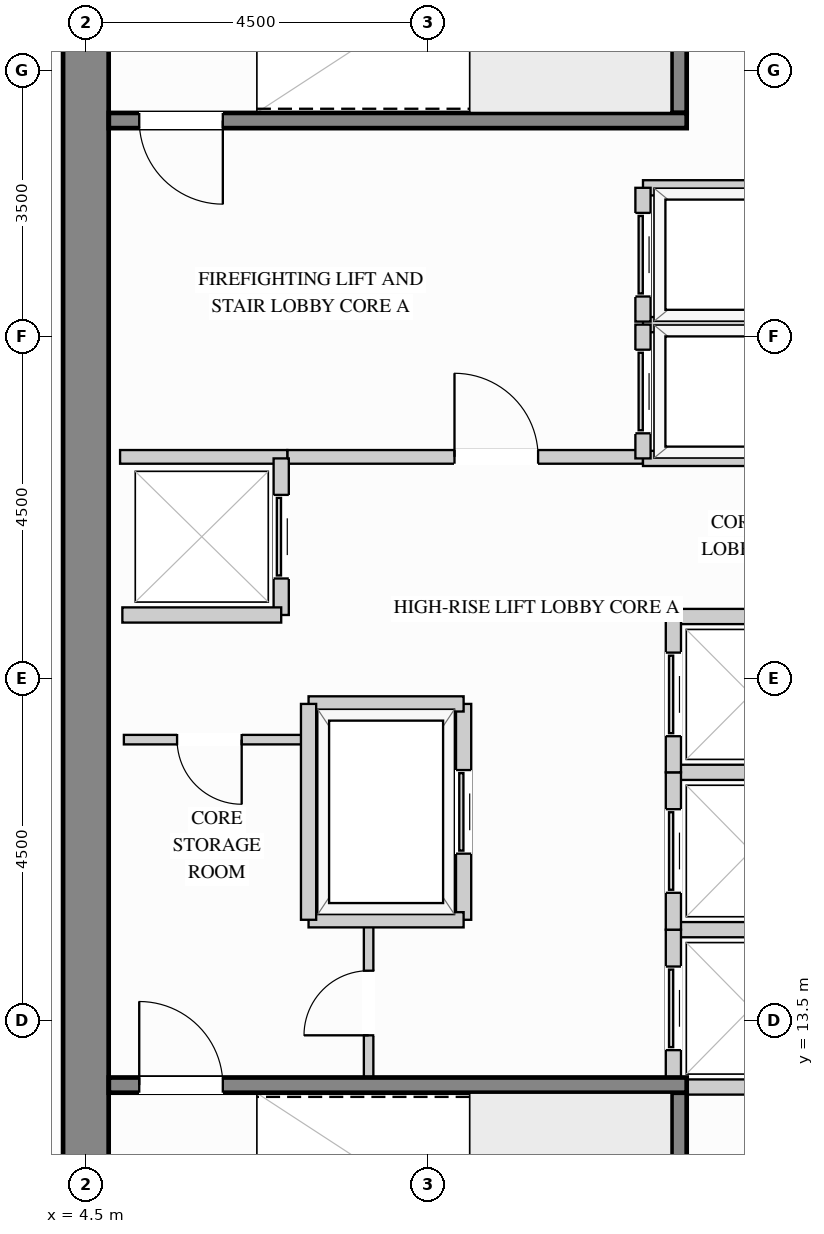
"""IFC4 building model, lengths in metres.
Left out: names, types, materials, properties, quantities, classifications, styles, units other than length and angle.
Written with IfcOpenShell. Run it as: python <this file> out.ifc"""

import sys

from ifc_helpers import new_model, si_unit, direction, frame, frame_2d, origin, place, context, subcontext, project, spatial, rectangle, extrude, source, transform, mapped, element, fill, save


model = new_model("IFC4")
c1 = context("Model", 3, precision=1e-05, world=origin(), true_north=direction((0.0, 1.0)))
c2 = subcontext(c1, "Body", "Model", "MODEL_VIEW")
j1 = project(units=[si_unit("LENGTHUNIT", "METRE"), si_unit("PLANEANGLEUNIT", "RADIAN")], contexts=[c1])
p1 = place(None, origin())
s1 = spatial("IfcSite", under=j1, at=p1, CompositionType="ELEMENT")
p2 = place(p1, origin())
s2 = spatial("IfcBuilding", under=s1, at=p2, CompositionType="ELEMENT")
p3 = place(p2, frame((0.0, 0.0, 171.9)))
s3 = spatial("IfcBuildingStorey", under=s2, at=p3, CompositionType="ELEMENT", Elevation=171.9)
m1 = source(origin(), c2, "Body", "SweptSolid", [
    extrude(rectangle(XDim=20.4, YDim=0.6, at=frame_2d((10.2, 0.0))), origin(), (0.0, 0.0, 1.0), 3.4),
])
p4 = place(p3, frame((4.5, 8.8, 0.0), z_axis=(0.0, 0.0, 1.0), x_axis=(0.0, 1.0, 0.0)))
e1 = element("IfcWall", 1, at=p4, inside=s3, PredefinedType="SHEAR", context=c2, shape_type="MappedRepresentation", body=[
    mapped(m1, transform((0.0, 0.0, 0.0), x_axis=(1.0, 0.0, 0.0), y_axis=(0.0, 1.0, 0.0), z_axis=(0.0, 0.0, 1.0))),
])
p5 = place(p3, frame((7.15, 20.92, 0.0), z_axis=(0.0, 0.0, 1.0), x_axis=(1.0, 0.0, 0.0)))
e2 = element("IfcWall", 2, at=p5, inside=s3, PredefinedType="PARTITIONING", context=c2, shape_type="SweptSolid", body=[
    extrude(rectangle(XDim=4.68, YDim=0.18, at=frame_2d((2.34, 0.0))), origin(), (0.0, 0.0, 1.0), 3.385),
])
p6 = place(p5, frame((2.2, 0.0, 0.0)))
e3 = element("IfcOpeningElement", 3, at=p6, cuts=e2, PredefinedType="OPENING", context=c2, shape_type="SweptSolid", body=[
    extrude(rectangle(XDim=1.1, YDim=2.15, at=frame_2d((0.55, 1.075))), frame((0.0, 0.1, 0.0), z_axis=(0.0, -1.0, 0.0), x_axis=(1.0, 0.0, 0.0)), (0.0, 0.0, 1.0), 0.2),
])
m2 = source(origin(), c2, "Body", "SweptSolid", [
    extrude(rectangle(XDim=2.2, YDim=0.18, at=frame_2d((1.1, 0.0))), origin(), (0.0, 0.0, 1.0), 3.385),
])
p7 = place(p3, frame((4.95, 20.92, 0.0), z_axis=(0.0, 0.0, 1.0), x_axis=(1.0, 0.0, 0.0)))
e4 = element("IfcWall", 4, at=p7, inside=s3, PredefinedType="PARTITIONING", context=c2, shape_type="MappedRepresentation", body=[
    mapped(m2, transform((0.0, 0.0, 0.0), x_axis=(1.0, 0.0, 0.0), y_axis=(0.0, 1.0, 0.0), z_axis=(0.0, 0.0, 1.0))),
])
p8 = place(p3, frame((8.22, 12.75, 0.0), z_axis=(0.0, 0.0, 1.0), x_axis=(0.0, 1.0, 0.0)))
e5 = element("IfcWall", 5, at=p8, inside=s3, PredefinedType="PARTITIONING", context=c2, shape_type="SweptSolid", body=[
    extrude(rectangle(XDim=2.07, YDim=0.125, at=frame_2d((1.035, 0.0))), origin(), (0.0, 0.0, 1.0), 3.385),
])
p9 = place(p8, frame((0.56, 0.0, 0.0)))
e6 = element("IfcOpeningElement", 6, at=p9, cuts=e5, PredefinedType="OPENING", context=c2, shape_type="SweptSolid", body=[
    extrude(rectangle(XDim=0.85, YDim=2.1, at=frame_2d((0.425, 1.05))), frame((0.0, 0.073, 0.0), z_axis=(0.0, -1.0, 0.0), x_axis=(1.0, 0.0, 0.0)), (0.0, 0.0, 1.0), 0.145),
])
p10 = place(p3, frame((5.0, 17.2, 0.0), z_axis=(0.0, 0.0, 1.0), x_axis=(1.0, 0.0, 0.0)))
e7 = element("IfcWall", 7, at=p10, inside=s3, PredefinedType="PARTITIONING", context=c2, shape_type="SweptSolid", body=[
    extrude(rectangle(XDim=2.4, YDim=0.125, at=frame_2d((1.2, 0.0))), origin(), (0.0, 0.0, 1.0), 3.385),
])
p11 = place(p10, frame((0.7, 0.0, 0.0)))
e8 = element("IfcOpeningElement", 8, at=p11, cuts=e7, PredefinedType="OPENING", context=c2, shape_type="SweptSolid", body=[
    extrude(rectangle(XDim=0.85, YDim=2.1, at=frame_2d((0.425, 1.05))), frame((0.0, 0.073, 0.0), z_axis=(0.0, -1.0, 0.0), x_axis=(1.0, 0.0, 0.0)), (0.0, 0.0, 1.0), 0.145),
])
m3 = source(origin(), c2, "Body", "SweptSolid", [
    extrude(rectangle(XDim=2.34, YDim=0.2, at=frame_2d((1.17, 0.0))), origin(), (0.0, 0.0, 1.0), 3.385),
])
for number, where, z_axis, x_axis in (
    (9, (11.83, 22.66, 0.0), (0.0, 0.0, 1.0), (1.0, 0.0, 0.0)),
    (10, (11.83, 20.9, 0.0), (0.0, 0.0, 1.0), (1.0, 0.0, 0.0)),
):
    element("IfcWall", number, at=place(p3, frame(where, z_axis=z_axis, x_axis=x_axis)), inside=s3, PredefinedType="PARTITIONING", context=c2, shape_type="MappedRepresentation", body=[
        mapped(m3, transform((0.0, 0.0, 0.0), x_axis=(1.0, 0.0, 0.0), y_axis=(0.0, 1.0, 0.0), z_axis=(0.0, 0.0, 1.0))),
    ])
p12 = place(p3, frame((11.83, 20.9, 0.0), z_axis=(0.0, 0.0, 1.0), x_axis=(0.0, 1.0, 0.0)))
e11 = element("IfcWall", 11, at=p12, inside=s3, PredefinedType="PARTITIONING", context=c2, shape_type="SweptSolid", body=[
    extrude(rectangle(XDim=1.76, YDim=0.2, at=frame_2d((0.88, 0.0))), origin(), (0.0, 0.0, 1.0), 3.385),
])
p13 = place(p12, frame((0.33, 0.0, 0.0)))
e12 = element("IfcOpeningElement", 12, at=p13, cuts=e11, PredefinedType="OPENING", context=c2, shape_type="SweptSolid", body=[
    extrude(rectangle(XDim=1.1, YDim=2.2, at=frame_2d((0.55, 1.1))), frame((0.0, 0.11, 0.0), z_axis=(0.0, -1.0, 0.0), x_axis=(1.0, 0.0, 0.0)), (0.0, 0.0, 1.0), 0.22),
])
p14 = place(p3, frame((11.83, 24.46, 0.0), z_axis=(0.0, 0.0, 1.0), x_axis=(1.0, 0.0, 0.0)))
e13 = element("IfcWall", 13, at=p14, inside=s3, PredefinedType="PARTITIONING", context=c2, shape_type="MappedRepresentation", body=[
    mapped(m3, transform((0.0, 0.0, 0.0), x_axis=(1.0, 0.0, 0.0), y_axis=(0.0, 1.0, 0.0), z_axis=(0.0, 0.0, 1.0))),
])
p15 = place(p3, frame((11.83, 22.7, 0.0), z_axis=(0.0, 0.0, 1.0), x_axis=(0.0, 1.0, 0.0)))
e14 = element("IfcWall", 14, at=p15, inside=s3, PredefinedType="PARTITIONING", context=c2, shape_type="SweptSolid", body=[
    extrude(rectangle(XDim=1.76, YDim=0.2, at=frame_2d((0.88, 0.0))), origin(), (0.0, 0.0, 1.0), 3.385),
])
p16 = place(p15, frame((0.33, 0.0, 0.0)))
e15 = element("IfcOpeningElement", 15, at=p16, cuts=e14, PredefinedType="OPENING", context=c2, shape_type="SweptSolid", body=[
    extrude(rectangle(XDim=1.1, YDim=2.2, at=frame_2d((0.55, 1.1))), frame((0.0, 0.11, 0.0), z_axis=(0.0, -1.0, 0.0), x_axis=(1.0, 0.0, 0.0)), (0.0, 0.0, 1.0), 0.22),
])
m4 = source(origin(), c2, "Body", "SweptSolid", [
    extrude(rectangle(XDim=1.94, YDim=0.2, at=frame_2d((0.97, 0.0))), origin(), (0.0, 0.0, 1.0), 3.385),
])
for number, where, z_axis, x_axis in (
    (16, (12.23, 14.7, 0.0), (0.0, 0.0, 1.0), (1.0, 0.0, 0.0)),
    (17, (12.23, 12.63, 0.0), (0.0, 0.0, 1.0), (1.0, 0.0, 0.0)),
):
    element("IfcWall", number, at=place(p3, frame(where, z_axis=z_axis, x_axis=x_axis)), inside=s3, PredefinedType="PARTITIONING", context=c2, shape_type="MappedRepresentation", body=[
        mapped(m4, transform((0.0, 0.0, 0.0), x_axis=(1.0, 0.0, 0.0), y_axis=(0.0, 1.0, 0.0), z_axis=(0.0, 0.0, 1.0))),
    ])
p17 = place(p3, frame((12.23, 12.63, 0.0), z_axis=(0.0, 0.0, 1.0), x_axis=(0.0, 1.0, 0.0)))
e18 = element("IfcWall", 18, at=p17, inside=s3, PredefinedType="PARTITIONING", context=c2, shape_type="SweptSolid", body=[
    extrude(rectangle(XDim=2.07, YDim=0.2, at=frame_2d((1.035, 0.0))), origin(), (0.0, 0.0, 1.0), 3.385),
])
p18 = place(p17, frame((0.485, 0.0, 0.0)))
e19 = element("IfcOpeningElement", 19, at=p18, cuts=e18, PredefinedType="OPENING", context=c2, shape_type="SweptSolid", body=[
    extrude(rectangle(XDim=1.1, YDim=2.2, at=frame_2d((0.55, 1.1))), frame((0.0, 0.11, 0.0), z_axis=(0.0, -1.0, 0.0), x_axis=(1.0, 0.0, 0.0)), (0.0, 0.0, 1.0), 0.22),
])
p19 = place(p3, frame((12.23, 16.77, 0.0), z_axis=(0.0, 0.0, 1.0), x_axis=(1.0, 0.0, 0.0)))
e20 = element("IfcWall", 20, at=p19, inside=s3, PredefinedType="PARTITIONING", context=c2, shape_type="MappedRepresentation", body=[
    mapped(m4, transform((0.0, 0.0, 0.0), x_axis=(1.0, 0.0, 0.0), y_axis=(0.0, 1.0, 0.0), z_axis=(0.0, 0.0, 1.0))),
])
p20 = place(p3, frame((12.23, 14.7, 0.0), z_axis=(0.0, 0.0, 1.0), x_axis=(0.0, 1.0, 0.0)))
e21 = element("IfcWall", 21, at=p20, inside=s3, PredefinedType="PARTITIONING", context=c2, shape_type="SweptSolid", body=[
    extrude(rectangle(XDim=2.07, YDim=0.2, at=frame_2d((1.035, 0.0))), origin(), (0.0, 0.0, 1.0), 3.385),
])
p21 = place(p20, frame((0.485, 0.0, 0.0)))
e22 = element("IfcOpeningElement", 22, at=p21, cuts=e21, PredefinedType="OPENING", context=c2, shape_type="SweptSolid", body=[
    extrude(rectangle(XDim=1.1, YDim=2.2, at=frame_2d((0.55, 1.1))), frame((0.0, 0.11, 0.0), z_axis=(0.0, -1.0, 0.0), x_axis=(1.0, 0.0, 0.0)), (0.0, 0.0, 1.0), 0.22),
])
p22 = place(p3, frame((12.23, 18.82, 0.0), z_axis=(0.0, 0.0, 1.0), x_axis=(1.0, 0.0, 0.0)))
e23 = element("IfcWall", 23, at=p22, inside=s3, PredefinedType="PARTITIONING", context=c2, shape_type="MappedRepresentation", body=[
    mapped(m4, transform((0.0, 0.0, 0.0), x_axis=(1.0, 0.0, 0.0), y_axis=(0.0, 1.0, 0.0), z_axis=(0.0, 0.0, 1.0))),
])
p23 = place(p3, frame((12.23, 16.77, 0.0), z_axis=(0.0, 0.0, 1.0), x_axis=(0.0, 1.0, 0.0)))
e24 = element("IfcWall", 24, at=p23, inside=s3, PredefinedType="PARTITIONING", context=c2, shape_type="SweptSolid", body=[
    extrude(rectangle(XDim=2.05, YDim=0.2, at=frame_2d((1.025, 0.0))), origin(), (0.0, 0.0, 1.0), 3.385),
])
p24 = place(p23, frame((0.475, 0.0, 0.0)))
e25 = element("IfcOpeningElement", 25, at=p24, cuts=e24, PredefinedType="OPENING", context=c2, shape_type="SweptSolid", body=[
    extrude(rectangle(XDim=1.1, YDim=2.2, at=frame_2d((0.55, 1.1))), frame((0.0, 0.11, 0.0), z_axis=(0.0, -1.0, 0.0), x_axis=(1.0, 0.0, 0.0)), (0.0, 0.0, 1.0), 0.22),
])
p25 = place(p3, frame((7.07, 18.84, 0.0), z_axis=(0.0, 0.0, 1.0), x_axis=(0.0, 1.0, 0.0)))
e26 = element("IfcWall", 26, at=p25, inside=s3, PredefinedType="PARTITIONING", context=c2, shape_type="SweptSolid", body=[
    extrude(rectangle(XDim=2.06, YDim=0.2, at=frame_2d((1.03, 0.0))), origin(), (0.0, 0.0, 1.0), 3.385),
])
p26 = place(p25, frame((0.48, 0.0, 0.0)))
e27 = element("IfcOpeningElement", 27, at=p26, cuts=e26, PredefinedType="OPENING", context=c2, shape_type="SweptSolid", body=[
    extrude(rectangle(XDim=1.1, YDim=2.2, at=frame_2d((0.55, 1.1))), frame((0.0, 0.11, 0.0), z_axis=(0.0, -1.0, 0.0), x_axis=(1.0, 0.0, 0.0)), (0.0, 0.0, 1.0), 0.22),
])
m5 = source(origin(), c2, "Body", "SweptSolid", [
    extrude(rectangle(XDim=2.09, YDim=0.2, at=frame_2d((1.045, 0.0))), origin(), (0.0, 0.0, 1.0), 3.385),
])
p27 = place(p3, frame((4.98, 18.84, 0.0), z_axis=(0.0, 0.0, 1.0), x_axis=(1.0, 0.0, 0.0)))
e28 = element("IfcWall", 28, at=p27, inside=s3, PredefinedType="PARTITIONING", context=c2, shape_type="MappedRepresentation", body=[
    mapped(m5, transform((0.0, 0.0, 0.0), x_axis=(1.0, 0.0, 0.0), y_axis=(0.0, 1.0, 0.0), z_axis=(0.0, 0.0, 1.0))),
])
p28 = place(p3, frame((9.47, 14.83, 0.0), z_axis=(0.0, 0.0, 1.0), x_axis=(0.0, 1.0, 0.0)))
e29 = element("IfcWall", 29, at=p28, inside=s3, PredefinedType="PARTITIONING", context=c2, shape_type="SweptSolid", body=[
    extrude(rectangle(XDim=2.84, YDim=0.2, at=frame_2d((1.42, 0.0))), origin(), (0.0, 0.0, 1.0), 3.385),
])
p29 = place(p28, frame((0.87, 0.0, 0.0)))
e30 = element("IfcOpeningElement", 30, at=p29, cuts=e29, PredefinedType="OPENING", context=c2, shape_type="SweptSolid", body=[
    extrude(rectangle(XDim=1.1, YDim=2.2, at=frame_2d((0.55, 1.1))), frame((0.0, 0.11, 0.0), z_axis=(0.0, -1.0, 0.0), x_axis=(1.0, 0.0, 0.0)), (0.0, 0.0, 1.0), 0.22),
])
m6 = source(origin(), c2, "Body", "SweptSolid", [
    extrude(rectangle(XDim=2.04, YDim=0.2, at=frame_2d((1.02, 0.0))), origin(), (0.0, 0.0, 1.0), 3.385),
])
for number, where, z_axis, x_axis in (
    (31, (7.43, 17.67, 0.0), (0.0, 0.0, 1.0), (1.0, 0.0, 0.0)),
    (32, (7.43, 14.83, 0.0), (0.0, 0.0, 1.0), (1.0, 0.0, 0.0)),
):
    element("IfcWall", number, at=place(p3, frame(where, z_axis=z_axis, x_axis=x_axis)), inside=s3, PredefinedType="PARTITIONING", context=c2, shape_type="MappedRepresentation", body=[
        mapped(m6, transform((0.0, 0.0, 0.0), x_axis=(1.0, 0.0, 0.0), y_axis=(0.0, 1.0, 0.0), z_axis=(0.0, 0.0, 1.0))),
    ])
m7 = source(origin(), c2, "Body", "SweptSolid", [
    extrude(rectangle(XDim=2.84, YDim=0.2, at=frame_2d((1.42, 0.0))), origin(), (0.0, 0.0, 1.0), 3.385),
])
p30 = place(p3, frame((7.43, 14.83, 0.0), z_axis=(0.0, 0.0, 1.0), x_axis=(0.0, 1.0, 0.0)))
e33 = element("IfcWall", 33, at=p30, inside=s3, PredefinedType="PARTITIONING", context=c2, shape_type="MappedRepresentation", body=[
    mapped(m7, transform((0.0, 0.0, 0.0), x_axis=(1.0, 0.0, 0.0), y_axis=(0.0, 1.0, 0.0), z_axis=(0.0, 0.0, 1.0))),
])
m8 = source(origin(), c2, "Body", "SweptSolid", [
    extrude(rectangle(XDim=3.753, YDim=0.2, at=frame_2d((1.876, 0.0))), origin(), (0.0, 0.0, 1.0), 3.4),
])
p31 = place(p3, frame((12.305, 8.802, 0.0), z_axis=(0.0, 0.0, 1.0), x_axis=(0.0, 1.0, 0.0)))
e34 = element("IfcWall", 34, at=p31, inside=s3, PredefinedType="SHEAR", context=c2, shape_type="MappedRepresentation", body=[
    mapped(m8, transform((0.0, 0.0, 0.0), x_axis=(1.0, 0.0, 0.0), y_axis=(0.0, 1.0, 0.0), z_axis=(0.0, 0.0, 1.0))),
])
p32 = place(p3, frame((4.802, 12.655, 0.0), z_axis=(0.0, 0.0, 1.0), x_axis=(1.0, 0.0, 0.0)))
e35 = element("IfcWall", 35, at=p32, inside=s3, PredefinedType="SHEAR", context=c2, shape_type="SweptSolid", body=[
    extrude(rectangle(XDim=7.603, YDim=0.2, at=frame_2d((3.802, 0.0))), origin(), (0.0, 0.0, 1.0), 3.4),
])
p33 = place(p32, frame((0.4, 0.0, 0.0)))
e36 = element("IfcOpeningElement", 36, at=p33, cuts=e35, PredefinedType="OPENING", context=c2, shape_type="SweptSolid", body=[
    extrude(rectangle(XDim=1.1, YDim=2.15, at=frame_2d((0.55, 1.075))), frame((0.0, 0.11, 0.0), z_axis=(0.0, -1.0, 0.0), x_axis=(1.0, 0.0, 0.0)), (0.0, 0.0, 1.0), 0.22),
])
p34 = place(p3, frame((12.305, 25.445, 0.0), z_axis=(0.0, 0.0, 1.0), x_axis=(0.0, 1.0, 0.0)))
e37 = element("IfcWall", 37, at=p34, inside=s3, PredefinedType="SHEAR", context=c2, shape_type="MappedRepresentation", body=[
    mapped(m8, transform((0.0, 0.0, 0.0), x_axis=(1.0, 0.0, 0.0), y_axis=(0.0, 1.0, 0.0), z_axis=(0.0, 0.0, 1.0))),
])
p35 = place(p3, frame((4.802, 25.345, 0.0), z_axis=(0.0, 0.0, 1.0), x_axis=(1.0, 0.0, 0.0)))
e38 = element("IfcWall", 38, at=p35, inside=s3, PredefinedType="SHEAR", context=c2, shape_type="SweptSolid", body=[
    extrude(rectangle(XDim=7.603, YDim=0.2, at=frame_2d((3.802, 0.0))), origin(), (0.0, 0.0, 1.0), 3.4),
])
p36 = place(p35, frame((0.4, 0.0, 0.0)))
e39 = element("IfcOpeningElement", 39, at=p36, cuts=e38, PredefinedType="OPENING", context=c2, shape_type="SweptSolid", body=[
    extrude(rectangle(XDim=1.1, YDim=2.15, at=frame_2d((0.55, 1.075))), frame((0.0, 0.11, 0.0), z_axis=(0.0, -1.0, 0.0), x_axis=(1.0, 0.0, 0.0)), (0.0, 0.0, 1.0), 0.22),
])
m9 = source(origin(), c2, "Body", "SweptSolid", [
    extrude(rectangle(XDim=1.1, YDim=2.15, at=frame_2d((0.55, 1.075))), frame((0.0, 0.025, 0.0), z_axis=(0.0, -1.0, 0.0), x_axis=(1.0, 0.0, 0.0)), (0.0, 0.0, 1.0), 0.05),
])
p37 = place(p6, origin())
e40 = element("IfcDoor", 40, at=p37, inside=s3, OperationType="SINGLE_SWING_LEFT", PredefinedType="DOOR", context=c2, shape_type="MappedRepresentation", body=[
    mapped(m9, transform((0.0, 0.0, 0.0), x_axis=(1.0, 0.0, 0.0), y_axis=(0.0, 1.0, 0.0), z_axis=(0.0, 0.0, 1.0))),
])
fill(e3, e40)
m10 = source(origin(), c2, "Body", "SweptSolid", [
    extrude(rectangle(XDim=1.1, YDim=2.2, at=frame_2d((0.55, 1.1))), frame((0.0, 0.025, 0.0), z_axis=(0.0, -1.0, 0.0), x_axis=(1.0, 0.0, 0.0)), (0.0, 0.0, 1.0), 0.05),
])
p38 = place(p13, origin())
e41 = element("IfcDoor", 41, at=p38, inside=s3, OperationType="SLIDING_TO_LEFT", PredefinedType="DOOR", context=c2, shape_type="MappedRepresentation", body=[
    mapped(m10, transform((0.0, 0.0, 0.0), x_axis=(1.0, 0.0, 0.0), y_axis=(0.0, 1.0, 0.0), z_axis=(0.0, 0.0, 1.0))),
])
fill(e12, e41)
p39 = place(p16, origin())
e42 = element("IfcDoor", 42, at=p39, inside=s3, OperationType="SLIDING_TO_LEFT", PredefinedType="DOOR", context=c2, shape_type="MappedRepresentation", body=[
    mapped(m10, transform((0.0, 0.0, 0.0), x_axis=(1.0, 0.0, 0.0), y_axis=(0.0, 1.0, 0.0), z_axis=(0.0, 0.0, 1.0))),
])
fill(e15, e42)
p40 = place(p18, origin())
e43 = element("IfcDoor", 43, at=p40, inside=s3, OperationType="SLIDING_TO_LEFT", PredefinedType="DOOR", context=c2, shape_type="MappedRepresentation", body=[
    mapped(m10, transform((0.0, 0.0, 0.0), x_axis=(1.0, 0.0, 0.0), y_axis=(0.0, 1.0, 0.0), z_axis=(0.0, 0.0, 1.0))),
])
fill(e19, e43)
p41 = place(p21, origin())
e44 = element("IfcDoor", 44, at=p41, inside=s3, OperationType="SLIDING_TO_LEFT", PredefinedType="DOOR", context=c2, shape_type="MappedRepresentation", body=[
    mapped(m10, transform((0.0, 0.0, 0.0), x_axis=(1.0, 0.0, 0.0), y_axis=(0.0, 1.0, 0.0), z_axis=(0.0, 0.0, 1.0))),
])
fill(e22, e44)
p42 = place(p24, origin())
e45 = element("IfcDoor", 45, at=p42, inside=s3, OperationType="SLIDING_TO_LEFT", PredefinedType="DOOR", context=c2, shape_type="MappedRepresentation", body=[
    mapped(m10, transform((0.0, 0.0, 0.0), x_axis=(1.0, 0.0, 0.0), y_axis=(0.0, 1.0, 0.0), z_axis=(0.0, 0.0, 1.0))),
])
fill(e25, e45)
p43 = place(p26, origin())
e46 = element("IfcDoor", 46, at=p43, inside=s3, OperationType="SLIDING_TO_LEFT", PredefinedType="DOOR", context=c2, shape_type="MappedRepresentation", body=[
    mapped(m10, transform((0.0, 0.0, 0.0), x_axis=(1.0, 0.0, 0.0), y_axis=(0.0, 1.0, 0.0), z_axis=(0.0, 0.0, 1.0))),
])
fill(e27, e46)
p44 = place(p29, origin())
e47 = element("IfcDoor", 47, at=p44, inside=s3, OperationType="SLIDING_TO_LEFT", PredefinedType="DOOR", context=c2, shape_type="MappedRepresentation", body=[
    mapped(m10, transform((0.0, 0.0, 0.0), x_axis=(1.0, 0.0, 0.0), y_axis=(0.0, 1.0, 0.0), z_axis=(0.0, 0.0, 1.0))),
])
fill(e30, e47)
m11 = source(origin(), c2, "Body", "SweptSolid", [
    extrude(rectangle(XDim=0.85, YDim=2.1, at=frame_2d((0.425, 1.05))), frame((0.0, 0.025, 0.0), z_axis=(0.0, -1.0, 0.0), x_axis=(1.0, 0.0, 0.0)), (0.0, 0.0, 1.0), 0.05),
])
p45 = place(p11, origin())
e48 = element("IfcDoor", 48, at=p45, inside=s3, OperationType="SINGLE_SWING_RIGHT", PredefinedType="DOOR", context=c2, shape_type="MappedRepresentation", body=[
    mapped(m11, transform((0.0, 0.0, 0.0), x_axis=(1.0, 0.0, 0.0), y_axis=(0.0, 1.0, 0.0), z_axis=(0.0, 0.0, 1.0))),
])
fill(e8, e48)
p46 = place(p9, origin())
e49 = element("IfcDoor", 49, at=p46, inside=s3, OperationType="SINGLE_SWING_LEFT", PredefinedType="DOOR", context=c2, shape_type="MappedRepresentation", body=[
    mapped(m11, transform((0.0, 0.0, 0.0), x_axis=(1.0, 0.0, 0.0), y_axis=(0.0, 1.0, 0.0), z_axis=(0.0, 0.0, 1.0))),
])
fill(e6, e49)
m12 = source(origin(), c2, "Body", "SweptSolid", [
    extrude(rectangle(XDim=1.1, YDim=2.15, at=frame_2d((0.55, 1.075))), frame((0.0, 0.025, 0.0), z_axis=(0.0, -1.0, 0.0), x_axis=(1.0, 0.0, 0.0)), (0.0, 0.0, 1.0), 0.05),
])
p47 = place(p33, origin())
e50 = element("IfcDoor", 50, at=p47, inside=s3, OperationType="SINGLE_SWING_LEFT", PredefinedType="DOOR", context=c2, shape_type="MappedRepresentation", body=[
    mapped(m12, transform((0.0, 0.0, 0.0), x_axis=(1.0, 0.0, 0.0), y_axis=(0.0, 1.0, 0.0), z_axis=(0.0, 0.0, 1.0))),
])
fill(e36, e50)
p48 = place(p36, origin())
e51 = element("IfcDoor", 51, at=p48, inside=s3, OperationType="SINGLE_SWING_RIGHT", PredefinedType="DOOR", context=c2, shape_type="MappedRepresentation", body=[
    mapped(m12, transform((0.0, 0.0, 0.0), x_axis=(1.0, 0.0, 0.0), y_axis=(0.0, 1.0, 0.0), z_axis=(0.0, 0.0, 1.0))),
])
fill(e39, e51)
save(model, sys.argv[1])
